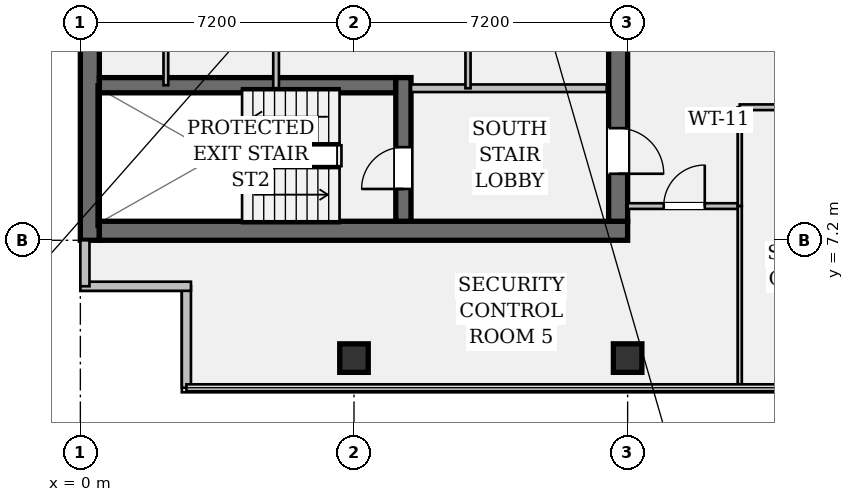
"""IFC4 building model, lengths in metres.
Left out: names, types, materials, properties, quantities, classifications, styles, units other than length and angle.
Written with IfcOpenShell. Run it as: python <this file> out.ifc"""

import sys

from ifc_helpers import new_model, si_unit, direction, frame, frame_2d, origin, origin_2d, place, context, subcontext, project, spatial, rectangle, hollow_rectangle, extrude, element, fill, save


model = new_model("IFC4")
c1 = context("Model", 3, precision=1e-05, world=origin(), true_north=direction((0.0, 1.0)))
c2 = subcontext(c1, "Body", "Model", "MODEL_VIEW")
j1 = project(units=[si_unit("LENGTHUNIT", "METRE"), si_unit("PLANEANGLEUNIT", "RADIAN")], contexts=[c1])
p1 = place(None, origin())
s1 = spatial("IfcSite", under=j1, at=p1, CompositionType="ELEMENT")
p2 = place(p1, origin())
s2 = spatial("IfcBuilding", under=s1, at=p2, CompositionType="ELEMENT")
p3 = place(p2, frame((0.0, 0.0, 222.25)))
s3 = spatial("IfcBuildingStorey", under=s2, at=p3, CompositionType="ELEMENT", Elevation=222.25)
p4 = place(p3, frame((0.25, 7.2, 0.0), z_axis=(0.0, 0.0, 1.0), x_axis=(0.0, 1.0, 0.0)))
e1 = element("IfcWall", 1, at=p4, inside=s3, PredefinedType="SHEAR", context=c2, shape_type="SweptSolid", body=[
    extrude(rectangle(XDim=28.8, YDim=0.5, at=frame_2d((14.4, 0.0))), origin(), (0.0, 0.0, 1.0), 3.24),
])
p5 = place(p3, frame((0.5, 7.45, 0.0), z_axis=(0.0, 0.0, 1.0), x_axis=(1.0, 0.0, 0.0)))
e2 = element("IfcWall", 2, at=p5, inside=s3, PredefinedType="SHEAR", context=c2, shape_type="SweptSolid", body=[
    extrude(rectangle(XDim=13.9, YDim=0.5, at=frame_2d((6.95, 0.0))), origin(), (0.0, 0.0, 1.0), 3.24),
])
p6 = place(p3, frame((14.15, 35.5, 0.0), z_axis=(0.0, 0.0, 1.0), x_axis=(0.0, -1.0, 0.0)))
e3 = element("IfcWall", 3, at=p6, inside=s3, PredefinedType="SHEAR", context=c2, shape_type="SweptSolid", body=[
    extrude(rectangle(XDim=27.8, YDim=0.5, at=frame_2d((13.9, 0.0))), origin(), (0.0, 0.0, 1.0), 3.24),
])
p7 = place(p6, frame((1.4, 0.0, 0.0)))
e4 = element("IfcOpeningElement", 4, at=p7, cuts=e3, PredefinedType="OPENING", context=c2, shape_type="SweptSolid", body=[
    extrude(rectangle(XDim=1.2, YDim=2.15, at=frame_2d((0.6, 1.075))), frame((0.0, 0.262, 0.0), z_axis=(0.0, -1.0, 0.0), x_axis=(1.0, 0.0, 0.0)), (0.0, 0.0, 1.0), 0.524),
])
p8 = place(p6, frame((25.35, 0.0, 0.0)))
e5 = element("IfcOpeningElement", 5, at=p8, cuts=e3, PredefinedType="OPENING", context=c2, shape_type="SweptSolid", body=[
    extrude(rectangle(XDim=1.2, YDim=2.15, at=frame_2d((0.6, 1.075))), frame((0.0, 0.262, 0.0), z_axis=(0.0, -1.0, 0.0), x_axis=(1.0, 0.0, 0.0)), (0.0, 0.0, 1.0), 0.524),
])
p9 = place(p6, frame((14.7, 0.0, 0.0)))
e6 = element("IfcOpeningElement", 6, at=p9, cuts=e3, PredefinedType="OPENING", context=c2, shape_type="SweptSolid", body=[
    extrude(rectangle(XDim=1.6, YDim=2.2, at=frame_2d((0.8, 1.1))), frame((0.0, 0.262, 0.0), z_axis=(0.0, -1.0, 0.0), x_axis=(1.0, 0.0, 0.0)), (0.0, 0.0, 1.0), 0.524),
])
p10 = place(p3, frame((0.5, 11.28, 0.0), z_axis=(0.0, 0.0, 1.0), x_axis=(1.0, 0.0, 0.0)))
e7 = element("IfcWall", 7, at=p10, inside=s3, PredefinedType="SHEAR", context=c2, shape_type="SweptSolid", body=[
    extrude(rectangle(XDim=7.8, YDim=0.4, at=frame_2d((3.9, 0.0))), origin(), (0.0, 0.0, 1.0), 3.24),
])
p11 = place(p3, frame((8.5, 7.7, 0.0), z_axis=(0.0, 0.0, 1.0), x_axis=(0.0, 1.0, 0.0)))
e8 = element("IfcWall", 8, at=p11, inside=s3, PredefinedType="SHEAR", context=c2, shape_type="SweptSolid", body=[
    extrude(rectangle(XDim=3.78, YDim=0.4, at=frame_2d((1.89, 0.0))), origin(), (0.0, 0.0, 1.0), 3.24),
])
p12 = place(p11, frame((0.85, 0.0, 0.0)))
e9 = element("IfcOpeningElement", 9, at=p12, cuts=e8, PredefinedType="OPENING", context=c2, shape_type="SweptSolid", body=[
    extrude(rectangle(XDim=1.1, YDim=2.15, at=frame_2d((0.55, 1.075))), frame((0.0, 0.212, 0.0), z_axis=(0.0, -1.0, 0.0), x_axis=(1.0, 0.0, 0.0)), (0.0, 0.0, 1.0), 0.424),
])
for number, where, z_axis, x_axis in (
    (10, (7.2, 4.1, 0.0), (0.0, 0.0, 1.0), (1.0, 0.0, 0.0)),
    (11, (14.4, 4.1, 0.0), (0.0, 0.0, 1.0), (1.0, 0.0, 0.0)),
):
    element("IfcColumn", number, at=place(p3, frame(where, z_axis=z_axis, x_axis=x_axis)), inside=s3, PredefinedType="COLUMN", context=c2, shape_type="SweptSolid", body=[
        extrude(hollow_rectangle(XDim=0.75, YDim=0.75, WallThickness=0.045, at=origin_2d()), origin(), (0.0, 0.0, 1.0), 3.24),
    ])
p13 = place(p3, frame((2.79, 3.32, 0.0), z_axis=(0.0, 0.0, 1.0), x_axis=(0.0, 1.0, 0.0)))
e12 = element("IfcWall", 12, at=p13, inside=s3, PredefinedType="STANDARD", context=c2, shape_type="SweptSolid", body=[
    extrude(rectangle(XDim=2.67, YDim=0.24, at=frame_2d((1.335, 0.0))), origin(), (0.0, 0.0, 1.0), 3.24),
])
p14 = place(p3, frame((2.91, 5.99, 0.0), z_axis=(0.0, 0.0, 1.0), x_axis=(-1.0, 0.0, 0.0)))
e13 = element("IfcWall", 13, at=p14, inside=s3, PredefinedType="STANDARD", context=c2, shape_type="SweptSolid", body=[
    extrude(rectangle(XDim=2.91, YDim=0.24, at=frame_2d((1.455, 0.0))), origin(), (0.0, 0.0, 1.0), 3.24),
])
p15 = place(p3, frame((0.12, 5.99, 0.0), z_axis=(0.0, 0.0, 1.0), x_axis=(0.0, 1.0, 0.0)))
e14 = element("IfcWall", 14, at=p15, inside=s3, PredefinedType="STANDARD", context=c2, shape_type="SweptSolid", body=[
    extrude(rectangle(XDim=1.21, YDim=0.24, at=frame_2d((0.605, 0.0))), origin(), (0.0, 0.0, 1.0), 3.24),
])
p16 = place(p3, frame((8.7, 11.2, 0.0), z_axis=(0.0, 0.0, 1.0), x_axis=(1.0, 0.0, 0.0)))
e15 = element("IfcWall", 15, at=p16, inside=s3, PredefinedType="PARTITIONING", context=c2, shape_type="SweptSolid", body=[
    extrude(rectangle(XDim=5.15, YDim=0.2, at=frame_2d((2.575, 0.0))), origin(), (0.0, 0.0, 1.0), 3.24),
])
p17 = place(p3, frame((5.15, 11.2, 0.0), z_axis=(0.0, 0.0, 1.0), x_axis=(0.0, 1.0, 0.0)))
e16 = element("IfcWall", 16, at=p17, inside=s3, PredefinedType="PARTITIONING", context=c2, shape_type="SweptSolid", body=[
    extrude(rectangle(XDim=6.6, YDim=0.15, at=frame_2d((3.3, 0.0))), origin(), (0.0, 0.0, 1.0), 3.24),
])
p18 = place(p3, frame((10.2, 11.2, 0.0), z_axis=(0.0, 0.0, 1.0), x_axis=(0.0, 1.0, 0.0)))
e17 = element("IfcWall", 17, at=p18, inside=s3, PredefinedType="PARTITIONING", context=c2, shape_type="SweptSolid", body=[
    extrude(rectangle(XDim=6.6, YDim=0.135, at=frame_2d((3.3, 0.0))), origin(), (0.0, 0.0, 1.0), 3.24),
])
p19 = place(p3, frame((2.25, 11.28, 0.0), z_axis=(0.0, 0.0, 1.0), x_axis=(0.0, 1.0, 0.0)))
e18 = element("IfcWall", 18, at=p19, inside=s3, PredefinedType="PARTITIONING", context=c2, shape_type="SweptSolid", body=[
    extrude(rectangle(XDim=4.42, YDim=0.125, at=frame_2d((2.21, 0.0))), origin(), (0.0, 0.0, 1.0), 3.24),
])
p20 = place(p19, frame((1.65, 0.0, 0.0)))
e19 = element("IfcOpeningElement", 19, at=p20, cuts=e18, PredefinedType="OPENING", context=c2, shape_type="SweptSolid", body=[
    extrude(rectangle(XDim=0.85, YDim=2.15, at=frame_2d((0.425, 1.075))), frame((0.0, 0.074, 0.0), z_axis=(0.0, -1.0, 0.0), x_axis=(1.0, 0.0, 0.0)), (0.0, 0.0, 1.0), 0.149),
])
p21 = place(p3, frame((14.4, 8.1, 0.0), z_axis=(0.0, 0.0, 1.0), x_axis=(1.0, 0.0, 0.0)))
e20 = element("IfcWall", 20, at=p21, inside=s3, PredefinedType="PARTITIONING", context=c2, shape_type="SweptSolid", body=[
    extrude(rectangle(XDim=2.95, YDim=0.15, at=frame_2d((1.475, 0.0))), origin(), (0.0, 0.0, 1.0), 2.808),
])
p22 = place(p21, frame((0.95, 0.0, 0.0)))
e21 = element("IfcOpeningElement", 21, at=p22, cuts=e20, PredefinedType="OPENING", context=c2, shape_type="SweptSolid", body=[
    extrude(rectangle(XDim=1.08, YDim=2.15, at=frame_2d((0.54, 1.075))), frame((0.0, 0.087, 0.0), z_axis=(0.0, -1.0, 0.0), x_axis=(1.0, 0.0, 0.0)), (0.0, 0.0, 1.0), 0.174),
])
p23 = place(p3, frame((17.35, 8.1, 0.0), z_axis=(0.0, 0.0, 1.0), x_axis=(0.0, 1.0, 0.0)))
e22 = element("IfcWall", 22, at=p23, inside=s3, PredefinedType="PARTITIONING", context=c2, shape_type="SweptSolid", body=[
    extrude(rectangle(XDim=2.6, YDim=0.11, at=frame_2d((1.3, 0.0))), origin(), (0.0, 0.0, 1.0), 3.24),
])
p24 = place(p3, frame((17.35, 10.7, 0.0), z_axis=(0.0, 0.0, 1.0), x_axis=(1.0, 0.0, 0.0)))
e23 = element("IfcWall", 23, at=p24, inside=s3, PredefinedType="PARTITIONING", context=c2, shape_type="SweptSolid", body=[
    extrude(rectangle(XDim=15.6, YDim=0.15, at=frame_2d((7.8, 0.0))), origin(), (0.0, 0.0, 1.0), 2.613),
])
p25 = place(p24, frame((2.02, 0.0, 0.0)))
e24 = element("IfcOpeningElement", 24, at=p25, cuts=e23, PredefinedType="OPENING", context=c2, shape_type="SweptSolid", body=[
    extrude(rectangle(XDim=1.08, YDim=2.15, at=frame_2d((0.54, 1.075))), frame((0.0, 0.087, 0.0), z_axis=(0.0, -1.0, 0.0), x_axis=(1.0, 0.0, 0.0)), (0.0, 0.0, 1.0), 0.174),
])
p26 = place(p24, frame((7.15, 0.0, 0.0)))
e25 = element("IfcOpeningElement", 25, at=p26, cuts=e23, PredefinedType="OPENING", context=c2, shape_type="SweptSolid", body=[
    extrude(rectangle(XDim=1.08, YDim=2.15, at=frame_2d((0.54, 1.075))), frame((0.0, 0.087, 0.0), z_axis=(0.0, -1.0, 0.0), x_axis=(1.0, 0.0, 0.0)), (0.0, 0.0, 1.0), 0.174),
])
p27 = place(p24, frame((12.43, 0.0, 0.0)))
e26 = element("IfcOpeningElement", 26, at=p27, cuts=e23, PredefinedType="OPENING", context=c2, shape_type="SweptSolid", body=[
    extrude(rectangle(XDim=1.08, YDim=2.15, at=frame_2d((0.54, 1.075))), frame((0.0, 0.087, 0.0), z_axis=(0.0, -1.0, 0.0), x_axis=(1.0, 0.0, 0.0)), (0.0, 0.0, 1.0), 0.174),
])
p28 = place(p3, frame((17.35, 3.32, 0.0), z_axis=(0.0, 0.0, 1.0), x_axis=(0.0, 1.0, 0.0)))
e27 = element("IfcWall", 27, at=p28, inside=s3, PredefinedType="PARTITIONING", context=c2, shape_type="SweptSolid", body=[
    extrude(rectangle(XDim=4.78, YDim=0.11, at=frame_2d((2.39, 0.0))), origin(), (0.0, 0.0, 1.0), 2.613),
])
p29 = place(p12, origin())
e28 = element("IfcDoor", 28, at=p29, inside=s3, OperationType="SINGLE_SWING_LEFT", PredefinedType="DOOR", context=c2, shape_type="SweptSolid", body=[
    extrude(rectangle(XDim=1.1, YDim=2.15, at=frame_2d((0.55, 1.075))), frame((0.0, 0.025, 0.0), z_axis=(0.0, -1.0, 0.0), x_axis=(1.0, 0.0, 0.0)), (0.0, 0.0, 1.0), 0.05),
])
fill(e9, e28)
p30 = place(p8, origin())
e29 = element("IfcDoor", 29, at=p30, inside=s3, OperationType="SINGLE_SWING_RIGHT", PredefinedType="DOOR", context=c2, shape_type="SweptSolid", body=[
    extrude(rectangle(XDim=1.2, YDim=2.15, at=frame_2d((0.6, 1.075))), frame((0.0, 0.025, 0.0), z_axis=(0.0, -1.0, 0.0), x_axis=(1.0, 0.0, 0.0)), (0.0, 0.0, 1.0), 0.05),
])
fill(e5, e29)
p31 = place(p22, origin())
e30 = element("IfcDoor", 30, at=p31, inside=s3, OperationType="SINGLE_SWING_RIGHT", PredefinedType="DOOR", context=c2, shape_type="SweptSolid", body=[
    extrude(rectangle(XDim=1.08, YDim=2.15, at=frame_2d((0.54, 1.075))), frame((0.0, 0.025, 0.0), z_axis=(0.0, -1.0, 0.0), x_axis=(1.0, 0.0, 0.0)), (0.0, 0.0, 1.0), 0.05),
])
fill(e21, e30)
save(model, sys.argv[1])
